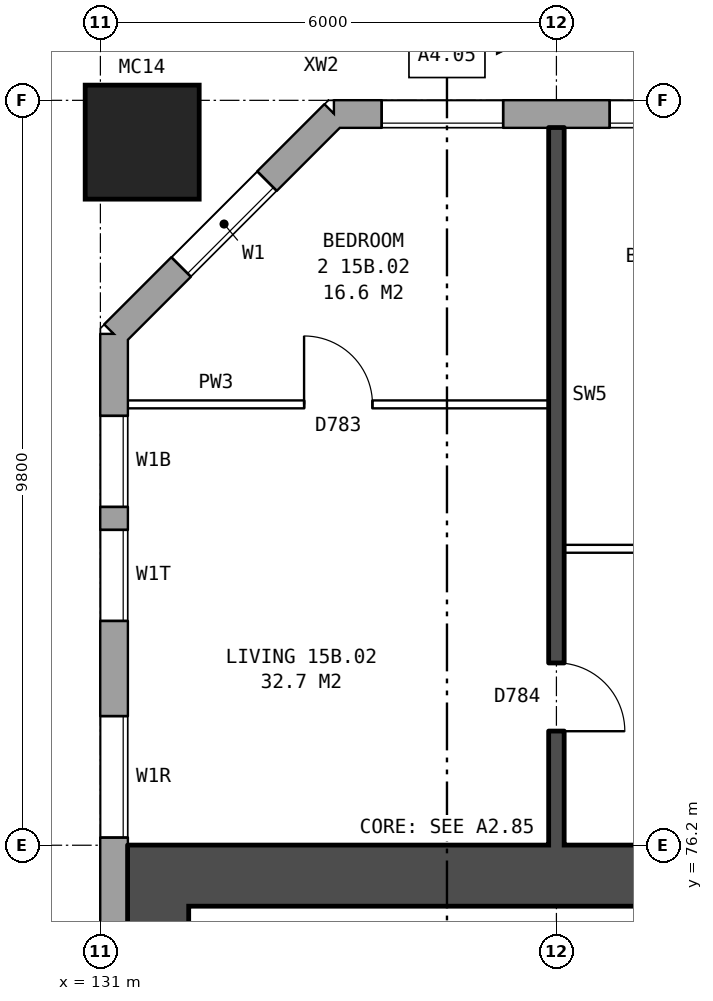
"""IFC4 building model, lengths in metres.
Left out: names, types, materials, properties, quantities, classifications, styles, units other than length and angle.
Written with IfcOpenShell. Run it as: python <this file> out.ifc"""

import sys

from ifc_helpers import new_model, si_unit, direction, frame, frame_2d, origin, origin_2d, place, context, subcontext, project, spatial, rectangle, hollow_rectangle, extrude, element, fill, save


model = new_model("IFC4")
c1 = context("Model", 3, precision=1e-05, world=origin(), true_north=direction((0.0, 1.0)))
c2 = subcontext(c1, "Body", "Model", "MODEL_VIEW")
j1 = project(units=[si_unit("LENGTHUNIT", "METRE"), si_unit("PLANEANGLEUNIT", "RADIAN")], contexts=[c1])
p1 = place(None, origin())
s1 = spatial("IfcSite", under=j1, at=p1, CompositionType="ELEMENT")
p2 = place(p1, origin())
s2 = spatial("IfcBuilding", under=s1, at=p2, CompositionType="ELEMENT")
p3 = place(p2, frame((0.0, 0.0, 56.7)))
s3 = spatial("IfcBuildingStorey", under=s2, at=p3, CompositionType="ELEMENT", Elevation=56.7)
p4 = place(p3, frame((131.55, 85.45, 0.0), z_axis=(0.0, 0.0, 1.0), x_axis=(1.0, 0.0, 0.0)))
e1 = element("IfcColumn", 1, at=p4, inside=s3, PredefinedType="COLUMN", context=c2, shape_type="SweptSolid", body=[
    extrude(hollow_rectangle(XDim=1.5, YDim=1.5, WallThickness=0.08, at=origin_2d()), origin(), (0.0, 0.0, 1.0), 3.1),
])
p5 = place(p3, frame((173.425, 85.82, 0.0), z_axis=(0.0, 0.0, 1.0), x_axis=(-1.0, 0.0, 0.0)))
e2 = element("IfcWall", 2, at=p5, inside=s3, PredefinedType="STANDARD", context=c2, shape_type="SweptSolid", body=[
    extrude(rectangle(XDim=39.351, YDim=0.36, at=frame_2d((19.675, 0.0))), origin(), (0.0, 0.0, 1.0), 2.85),
])
p6 = place(p5, frame((1.125, 0.0, 0.8)))
e3 = element("IfcOpeningElement", 3, at=p6, cuts=e2, PredefinedType="OPENING", context=c2, shape_type="SweptSolid", body=[
    extrude(rectangle(XDim=1.6, YDim=1.8, at=frame_2d((0.8, 0.9))), frame((0.0, 0.19, 0.0), z_axis=(0.0, -1.0, 0.0), x_axis=(1.0, 0.0, 0.0)), (0.0, 0.0, 1.0), 0.38),
])
p7 = place(p5, frame((4.125, 0.0, 0.8)))
e4 = element("IfcOpeningElement", 4, at=p7, cuts=e2, PredefinedType="OPENING", context=c2, shape_type="SweptSolid", body=[
    extrude(rectangle(XDim=1.6, YDim=1.8, at=frame_2d((0.8, 0.9))), frame((0.0, 0.19, 0.0), z_axis=(0.0, -1.0, 0.0), x_axis=(1.0, 0.0, 0.0)), (0.0, 0.0, 1.0), 0.38),
])
p8 = place(p5, frame((7.125, 0.0, 0.8)))
e5 = element("IfcOpeningElement", 5, at=p8, cuts=e2, PredefinedType="OPENING", context=c2, shape_type="SweptSolid", body=[
    extrude(rectangle(XDim=1.6, YDim=1.8, at=frame_2d((0.8, 0.9))), frame((0.0, 0.19, 0.0), z_axis=(0.0, -1.0, 0.0), x_axis=(1.0, 0.0, 0.0)), (0.0, 0.0, 1.0), 0.38),
])
p9 = place(p5, frame((10.125, 0.0, 0.8)))
e6 = element("IfcOpeningElement", 6, at=p9, cuts=e2, PredefinedType="OPENING", context=c2, shape_type="SweptSolid", body=[
    extrude(rectangle(XDim=1.6, YDim=1.8, at=frame_2d((0.8, 0.9))), frame((0.0, 0.19, 0.0), z_axis=(0.0, -1.0, 0.0), x_axis=(1.0, 0.0, 0.0)), (0.0, 0.0, 1.0), 0.38),
])
p10 = place(p5, frame((12.625, 0.0, 1.25)))
e7 = element("IfcOpeningElement", 7, at=p10, cuts=e2, PredefinedType="OPENING", context=c2, shape_type="SweptSolid", body=[
    extrude(rectangle(XDim=0.8, YDim=1.2, at=frame_2d((0.4, 0.6))), frame((0.0, 0.19, 0.0), z_axis=(0.0, -1.0, 0.0), x_axis=(1.0, 0.0, 0.0)), (0.0, 0.0, 1.0), 0.38),
])
p11 = place(p5, frame((16.125, 0.0, 0.8)))
e8 = element("IfcOpeningElement", 8, at=p11, cuts=e2, PredefinedType="OPENING", context=c2, shape_type="SweptSolid", body=[
    extrude(rectangle(XDim=1.6, YDim=1.8, at=frame_2d((0.8, 0.9))), frame((0.0, 0.19, 0.0), z_axis=(0.0, -1.0, 0.0), x_axis=(1.0, 0.0, 0.0)), (0.0, 0.0, 1.0), 0.38),
])
p12 = place(p5, frame((19.125, 0.0, 0.8)))
e9 = element("IfcOpeningElement", 9, at=p12, cuts=e2, PredefinedType="OPENING", context=c2, shape_type="SweptSolid", body=[
    extrude(rectangle(XDim=1.6, YDim=1.8, at=frame_2d((0.8, 0.9))), frame((0.0, 0.19, 0.0), z_axis=(0.0, -1.0, 0.0), x_axis=(1.0, 0.0, 0.0)), (0.0, 0.0, 1.0), 0.38),
])
p13 = place(p5, frame((21.575, 0.0, 0.8)))
e10 = element("IfcOpeningElement", 10, at=p13, cuts=e2, PredefinedType="OPENING", context=c2, shape_type="SweptSolid", body=[
    extrude(rectangle(XDim=1.4, YDim=1.8, at=frame_2d((0.7, 0.9))), frame((0.0, 0.19, 0.0), z_axis=(0.0, -1.0, 0.0), x_axis=(1.0, 0.0, 0.0)), (0.0, 0.0, 1.0), 0.38),
])
p14 = place(p5, frame((25.275, 0.0, 1.7)))
e11 = element("IfcOpeningElement", 11, at=p14, cuts=e2, PredefinedType="OPENING", context=c2, shape_type="SweptSolid", body=[
    extrude(rectangle(XDim=0.8, YDim=0.9, at=frame_2d((0.4, 0.45))), frame((0.0, 0.19, 0.0), z_axis=(0.0, -1.0, 0.0), x_axis=(1.0, 0.0, 0.0)), (0.0, 0.0, 1.0), 0.38),
])
p15 = place(p5, frame((28.125, 0.0, 0.8)))
e12 = element("IfcOpeningElement", 12, at=p15, cuts=e2, PredefinedType="OPENING", context=c2, shape_type="SweptSolid", body=[
    extrude(rectangle(XDim=1.6, YDim=1.8, at=frame_2d((0.8, 0.9))), frame((0.0, 0.19, 0.0), z_axis=(0.0, -1.0, 0.0), x_axis=(1.0, 0.0, 0.0)), (0.0, 0.0, 1.0), 0.38),
])
p16 = place(p5, frame((31.125, 0.0, 0.8)))
e13 = element("IfcOpeningElement", 13, at=p16, cuts=e2, PredefinedType="OPENING", context=c2, shape_type="SweptSolid", body=[
    extrude(rectangle(XDim=1.6, YDim=1.8, at=frame_2d((0.8, 0.9))), frame((0.0, 0.19, 0.0), z_axis=(0.0, -1.0, 0.0), x_axis=(1.0, 0.0, 0.0)), (0.0, 0.0, 1.0), 0.38),
])
p17 = place(p5, frame((34.125, 0.0, 0.8)))
e14 = element("IfcOpeningElement", 14, at=p17, cuts=e2, PredefinedType="OPENING", context=c2, shape_type="SweptSolid", body=[
    extrude(rectangle(XDim=1.6, YDim=1.8, at=frame_2d((0.8, 0.9))), frame((0.0, 0.19, 0.0), z_axis=(0.0, -1.0, 0.0), x_axis=(1.0, 0.0, 0.0)), (0.0, 0.0, 1.0), 0.38),
])
p18 = place(p5, frame((37.125, 0.0, 0.8)))
e15 = element("IfcOpeningElement", 15, at=p18, cuts=e2, PredefinedType="OPENING", context=c2, shape_type="SweptSolid", body=[
    extrude(rectangle(XDim=1.6, YDim=1.8, at=frame_2d((0.8, 0.9))), frame((0.0, 0.19, 0.0), z_axis=(0.0, -1.0, 0.0), x_axis=(1.0, 0.0, 0.0)), (0.0, 0.0, 1.0), 0.38),
])
p19 = place(p5, frame((15.125, 0.0, 0.65)))
e16 = element("IfcOpeningElement", 16, at=p19, cuts=e2, PredefinedType="OPENING", context=c2, shape_type="SweptSolid", body=[
    extrude(rectangle(XDim=0.6, YDim=0.9, at=frame_2d((0.3, 0.45))), frame((0.0, 0.19, 0.0), z_axis=(0.0, -1.0, 0.0), x_axis=(1.0, 0.0, 0.0)), (0.0, 0.0, 1.0), 0.38),
])
p20 = place(p5, frame((23.275, 0.0, 0.8)))
e17 = element("IfcOpeningElement", 17, at=p20, cuts=e2, PredefinedType="OPENING", context=c2, shape_type="SweptSolid", body=[
    extrude(rectangle(XDim=0.8, YDim=0.9, at=frame_2d((0.4, 0.45))), frame((0.0, 0.19, 0.0), z_axis=(0.0, -1.0, 0.0), x_axis=(1.0, 0.0, 0.0)), (0.0, 0.0, 1.0), 0.38),
])
p21 = place(p5, frame((26.375, 0.0, 0.8)))
e18 = element("IfcOpeningElement", 18, at=p21, cuts=e2, PredefinedType="OPENING", context=c2, shape_type="SweptSolid", body=[
    extrude(rectangle(XDim=0.8, YDim=1.8, at=frame_2d((0.4, 0.9))), frame((0.0, 0.19, 0.0), z_axis=(0.0, -1.0, 0.0), x_axis=(1.0, 0.0, 0.0)), (0.0, 0.0, 1.0), 0.38),
])
p22 = place(p3, frame((134.075, 85.82, 0.0), z_axis=(0.0, 0.0, 1.0), x_axis=(-0.707106781187, -0.707106781187, 0.0)))
e19 = element("IfcWall", 19, at=p22, inside=s3, PredefinedType="STANDARD", context=c2, shape_type="SweptSolid", body=[
    extrude(rectangle(XDim=4.094, YDim=0.36, at=frame_2d((2.047, 0.0))), origin(), (0.0, 0.0, 1.0), 2.85),
])
p23 = place(p22, frame((1.247, 0.0, 0.8)))
e20 = element("IfcOpeningElement", 20, at=p23, cuts=e19, PredefinedType="OPENING", context=c2, shape_type="SweptSolid", body=[
    extrude(rectangle(XDim=1.6, YDim=1.8, at=frame_2d((0.8, 0.9))), frame((0.0, 0.19, 0.0), z_axis=(0.0, -1.0, 0.0), x_axis=(1.0, 0.0, 0.0)), (0.0, 0.0, 1.0), 0.38),
])
p24 = place(p3, frame((131.18, 82.925, 0.0), z_axis=(0.0, 0.0, 1.0), x_axis=(0.0, -1.0, 0.0)))
e21 = element("IfcWall", 21, at=p24, inside=s3, PredefinedType="STANDARD", context=c2, shape_type="SweptSolid", body=[
    extrude(rectangle(XDim=25.851, YDim=0.36, at=frame_2d((12.925, 0.0))), origin(), (0.0, 0.0, 1.0), 2.85),
])
p25 = place(p24, frame((1.075, 0.0, 0.8)))
e22 = element("IfcOpeningElement", 22, at=p25, cuts=e21, PredefinedType="OPENING", context=c2, shape_type="SweptSolid", body=[
    extrude(rectangle(XDim=1.2, YDim=1.8, at=frame_2d((0.6, 0.9))), frame((0.0, 0.19, 0.0), z_axis=(0.0, -1.0, 0.0), x_axis=(1.0, 0.0, 0.0)), (0.0, 0.0, 1.0), 0.38),
])
p26 = place(p24, frame((2.575, 0.0, 0.8)))
e23 = element("IfcOpeningElement", 23, at=p26, cuts=e21, PredefinedType="OPENING", context=c2, shape_type="SweptSolid", body=[
    extrude(rectangle(XDim=1.2, YDim=0.9, at=frame_2d((0.6, 0.45))), frame((0.0, 0.19, 0.0), z_axis=(0.0, -1.0, 0.0), x_axis=(1.0, 0.0, 0.0)), (0.0, 0.0, 1.0), 0.38),
])
p27 = place(p24, frame((19.225, 0.0, 1.65)))
e24 = element("IfcOpeningElement", 24, at=p27, cuts=e21, PredefinedType="OPENING", context=c2, shape_type="SweptSolid", body=[
    extrude(rectangle(XDim=1.4, YDim=0.9, at=frame_2d((0.7, 0.45))), frame((0.0, 0.19, 0.0), z_axis=(0.0, -1.0, 0.0), x_axis=(1.0, 0.0, 0.0)), (0.0, 0.0, 1.0), 0.38),
])
p28 = place(p24, frame((22.525, 0.0, 0.8)))
e25 = element("IfcOpeningElement", 25, at=p28, cuts=e21, PredefinedType="OPENING", context=c2, shape_type="SweptSolid", body=[
    extrude(rectangle(XDim=1.0, YDim=1.2, at=frame_2d((0.5, 0.6))), frame((0.0, 0.19, 0.0), z_axis=(0.0, -1.0, 0.0), x_axis=(1.0, 0.0, 0.0)), (0.0, 0.0, 1.0), 0.38),
])
p29 = place(p24, frame((5.025, 0.0, 1.7)))
e26 = element("IfcOpeningElement", 26, at=p29, cuts=e21, PredefinedType="OPENING", context=c2, shape_type="SweptSolid", body=[
    extrude(rectangle(XDim=1.6, YDim=0.9, at=frame_2d((0.8, 0.45))), frame((0.0, 0.19, 0.0), z_axis=(0.0, -1.0, 0.0), x_axis=(1.0, 0.0, 0.0)), (0.0, 0.0, 1.0), 0.38),
])
p30 = place(p24, frame((21.075, 0.0, 0.25)))
e27 = element("IfcOpeningElement", 27, at=p30, cuts=e21, PredefinedType="OPENING", context=c2, shape_type="SweptSolid", body=[
    extrude(rectangle(XDim=0.6, YDim=0.9, at=frame_2d((0.3, 0.45))), frame((0.0, 0.19, 0.0), z_axis=(0.0, -1.0, 0.0), x_axis=(1.0, 0.0, 0.0)), (0.0, 0.0, 1.0), 0.38),
])
p31 = place(p24, frame((23.825, 0.0, 0.8)))
e28 = element("IfcOpeningElement", 28, at=p31, cuts=e21, PredefinedType="OPENING", context=c2, shape_type="SweptSolid", body=[
    extrude(rectangle(XDim=1.4, YDim=1.8, at=frame_2d((0.7, 0.9))), frame((0.0, 0.19, 0.0), z_axis=(0.0, -1.0, 0.0), x_axis=(1.0, 0.0, 0.0)), (0.0, 0.0, 1.0), 0.38),
])
p32 = place(p3, frame((131.76, 64.6, 0.0), z_axis=(0.0, 0.0, 1.0), x_axis=(0.0, 1.0, 0.0)))
e29 = element("IfcWall", 29, at=p32, inside=s3, PredefinedType="SHEAR", context=c2, shape_type="SweptSolid", body=[
    extrude(rectangle(XDim=10.8, YDim=0.8, at=frame_2d((5.4, 0.0))), origin(), (0.0, 0.0, 1.0), 2.85),
])
p33 = place(p3, frame((139.76, 75.8, 0.0), z_axis=(0.0, 0.0, 1.0), x_axis=(-1.0, 0.0, 0.0)))
e30 = element("IfcWall", 30, at=p33, inside=s3, PredefinedType="SHEAR", context=c2, shape_type="SweptSolid", body=[
    extrude(rectangle(XDim=8.4, YDim=0.8, at=frame_2d((4.2, 0.0))), origin(), (0.0, 0.0, 1.0), 2.85),
])
p34 = place(p3, frame((137.1, 80.1, 0.0), z_axis=(0.0, 0.0, 1.0), x_axis=(1.0, 0.0, 0.0)))
e31 = element("IfcWall", 31, at=p34, inside=s3, PredefinedType="PARTITIONING", context=c2, shape_type="SweptSolid", body=[
    extrude(rectangle(XDim=5.8, YDim=0.1, at=frame_2d((2.9, 0.0))), origin(), (0.0, 0.0, 1.0), 2.85),
])
p35 = place(p34, frame((1.3, 0.0, 0.0)))
e32 = element("IfcOpeningElement", 32, at=p35, cuts=e31, PredefinedType="OPENING", context=c2, shape_type="SweptSolid", body=[
    extrude(rectangle(XDim=0.9, YDim=2.1, at=frame_2d((0.45, 1.05))), frame((0.0, 0.06, 0.0), z_axis=(0.0, -1.0, 0.0), x_axis=(1.0, 0.0, 0.0)), (0.0, 0.0, 1.0), 0.12),
])
p36 = place(p34, frame((4.2, 0.0, 0.0)))
e33 = element("IfcOpeningElement", 33, at=p36, cuts=e31, PredefinedType="OPENING", context=c2, shape_type="SweptSolid", body=[
    extrude(rectangle(XDim=0.9, YDim=2.1, at=frame_2d((0.45, 1.05))), frame((0.0, 0.06, 0.0), z_axis=(0.0, -1.0, 0.0), x_axis=(1.0, 0.0, 0.0)), (0.0, 0.0, 1.0), 0.12),
])
p37 = place(p3, frame((131.36, 82.0, 0.0), z_axis=(0.0, 0.0, 1.0), x_axis=(1.0, 0.0, 0.0)))
e34 = element("IfcWall", 34, at=p37, inside=s3, PredefinedType="PARTITIONING", context=c2, shape_type="SweptSolid", body=[
    extrude(rectangle(XDim=5.54, YDim=0.1, at=frame_2d((2.77, 0.0))), origin(), (0.0, 0.0, 1.0), 2.85),
])
p38 = place(p37, frame((2.32, 0.0, 0.0)))
e35 = element("IfcOpeningElement", 35, at=p38, cuts=e34, PredefinedType="OPENING", context=c2, shape_type="SweptSolid", body=[
    extrude(rectangle(XDim=0.9, YDim=2.1, at=frame_2d((0.45, 1.05))), frame((0.0, 0.06, 0.0), z_axis=(0.0, -1.0, 0.0), x_axis=(1.0, 0.0, 0.0)), (0.0, 0.0, 1.0), 0.12),
])
p39 = place(p3, frame((137.0, 76.2, 0.0), z_axis=(0.0, 0.0, 1.0), x_axis=(0.0, 1.0, 0.0)))
e36 = element("IfcWall", 36, at=p39, inside=s3, PredefinedType="SOLIDWALL", context=c2, shape_type="SweptSolid", body=[
    extrude(rectangle(XDim=9.44, YDim=0.2, at=frame_2d((4.72, 0.0))), origin(), (0.0, 0.0, 1.0), 2.85),
])
p40 = place(p39, frame((1.5, 0.0, 0.0)))
e37 = element("IfcOpeningElement", 37, at=p40, cuts=e36, PredefinedType="OPENING", context=c2, shape_type="SweptSolid", body=[
    extrude(rectangle(XDim=0.9, YDim=2.1, at=frame_2d((0.45, 1.05))), frame((0.0, 0.11, 0.0), z_axis=(0.0, -1.0, 0.0), x_axis=(1.0, 0.0, 0.0)), (0.0, 0.0, 1.0), 0.22),
])
p41 = place(p17, origin())
e38 = element("IfcWindow", 38, at=p41, inside=s3, PartitioningType="SINGLE_PANEL", PredefinedType="WINDOW", context=c2, shape_type="SweptSolid", body=[
    extrude(rectangle(XDim=1.6, YDim=1.8, at=frame_2d((0.8, 0.9))), frame((0.0, 0.15, 0.0), z_axis=(0.0, -1.0, 0.0), x_axis=(1.0, 0.0, 0.0)), (0.0, 0.0, 1.0), 0.06),
])
fill(e14, e38)
p42 = place(p18, origin())
e39 = element("IfcWindow", 39, at=p42, inside=s3, PartitioningType="SINGLE_PANEL", PredefinedType="WINDOW", context=c2, shape_type="SweptSolid", body=[
    extrude(rectangle(XDim=1.6, YDim=1.8, at=frame_2d((0.8, 0.9))), frame((0.0, 0.15, 0.0), z_axis=(0.0, -1.0, 0.0), x_axis=(1.0, 0.0, 0.0)), (0.0, 0.0, 1.0), 0.06),
])
fill(e15, e39)
p43 = place(p23, origin())
e40 = element("IfcWindow", 40, at=p43, inside=s3, PartitioningType="SINGLE_PANEL", PredefinedType="WINDOW", context=c2, shape_type="SweptSolid", body=[
    extrude(rectangle(XDim=1.6, YDim=1.8, at=frame_2d((0.8, 0.9))), frame((0.0, 0.15, 0.0), z_axis=(0.0, -1.0, 0.0), x_axis=(1.0, 0.0, 0.0)), (0.0, 0.0, 1.0), 0.06),
])
fill(e20, e40)
p44 = place(p25, origin())
e41 = element("IfcWindow", 41, at=p44, inside=s3, PartitioningType="SINGLE_PANEL", PredefinedType="WINDOW", context=c2, shape_type="SweptSolid", body=[
    extrude(rectangle(XDim=1.2, YDim=1.8, at=frame_2d((0.6, 0.9))), frame((0.0, 0.15, 0.0), z_axis=(0.0, -1.0, 0.0), x_axis=(1.0, 0.0, 0.0)), (0.0, 0.0, 1.0), 0.06),
])
fill(e22, e41)
p45 = place(p26, origin())
e42 = element("IfcWindow", 42, at=p45, inside=s3, PartitioningType="SINGLE_PANEL", PredefinedType="WINDOW", context=c2, shape_type="SweptSolid", body=[
    extrude(rectangle(XDim=1.2, YDim=0.9, at=frame_2d((0.6, 0.45))), frame((0.0, 0.15, 0.0), z_axis=(0.0, -1.0, 0.0), x_axis=(1.0, 0.0, 0.0)), (0.0, 0.0, 1.0), 0.06),
])
fill(e23, e42)
p46 = place(p38, origin())
e43 = element("IfcDoor", 43, at=p46, inside=s3, OperationType="SINGLE_SWING_LEFT", PredefinedType="DOOR", context=c2, shape_type="SweptSolid", body=[
    extrude(rectangle(XDim=0.9, YDim=2.1, at=frame_2d((0.45, 1.05))), frame((0.0, 0.025, 0.0), z_axis=(0.0, -1.0, 0.0), x_axis=(1.0, 0.0, 0.0)), (0.0, 0.0, 1.0), 0.05),
])
fill(e35, e43)
p47 = place(p40, frame((0.9, 0.0, 0.0), z_axis=(0.0, 0.0, 1.0), x_axis=(-1.0, 0.0, 0.0)))
e44 = element("IfcDoor", 44, at=p47, inside=s3, OperationType="SINGLE_SWING_RIGHT", PredefinedType="DOOR", context=c2, shape_type="SweptSolid", body=[
    extrude(rectangle(XDim=0.9, YDim=2.1, at=frame_2d((0.45, 1.05))), frame((0.0, 0.025, 0.0), z_axis=(0.0, -1.0, 0.0), x_axis=(1.0, 0.0, 0.0)), (0.0, 0.0, 1.0), 0.05),
])
fill(e37, e44)
p48 = place(p29, origin())
e45 = element("IfcWindow", 45, at=p48, inside=s3, PartitioningType="SINGLE_PANEL", PredefinedType="WINDOW", context=c2, shape_type="SweptSolid", body=[
    extrude(rectangle(XDim=1.6, YDim=0.9, at=frame_2d((0.8, 0.45))), frame((0.0, 0.15, 0.0), z_axis=(0.0, -1.0, 0.0), x_axis=(1.0, 0.0, 0.0)), (0.0, 0.0, 1.0), 0.06),
])
fill(e26, e45)
save(model, sys.argv[1])
